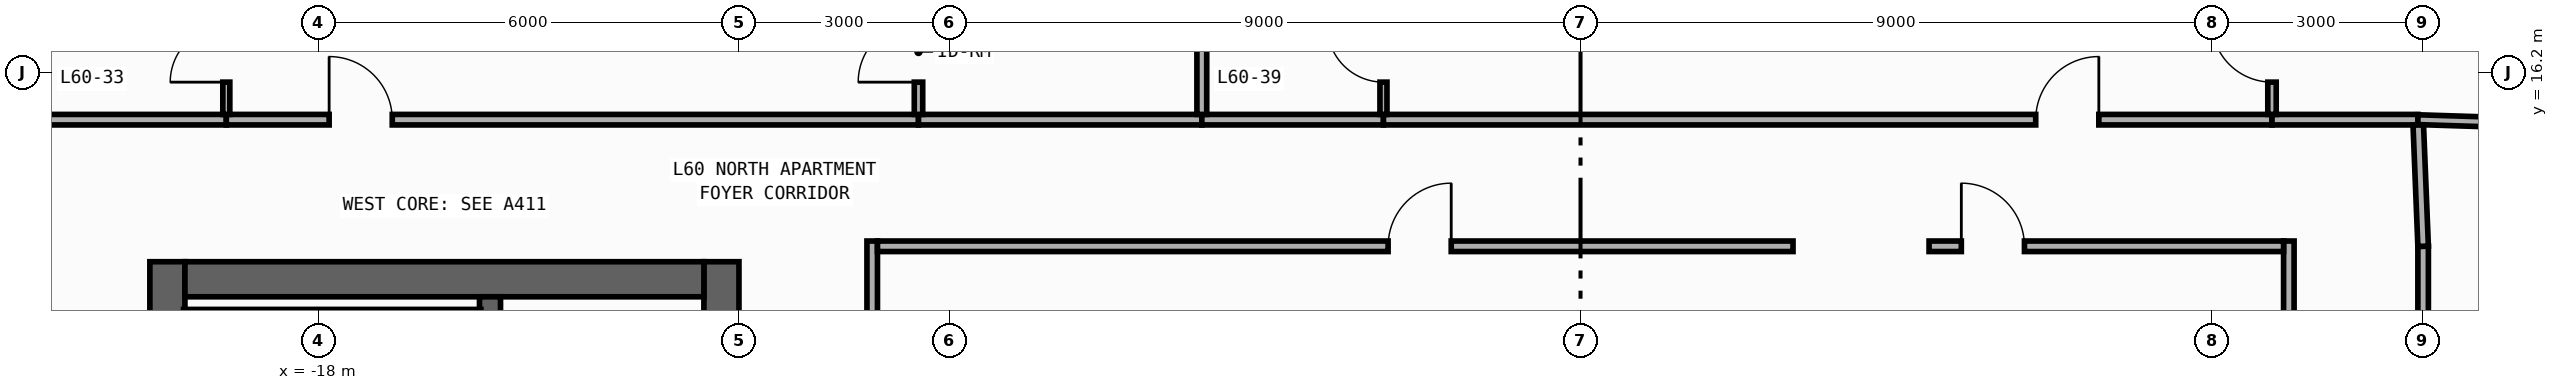
"""IFC4 building model, lengths in metres.
Left out: names, types, materials, properties, quantities, classifications, styles, units other than length and angle.
Written with IfcOpenShell. Run it as: python <this file> out.ifc"""

import sys

from ifc_helpers import new_model, si_unit, direction, frame, frame_2d, origin, place, context, subcontext, project, spatial, rectangle, extrude, element, fill, save


model = new_model("IFC4")
c1 = context("Model", 3, precision=1e-05, world=origin(), true_north=direction((0.0, 1.0)))
c2 = subcontext(c1, "Body", "Model", "MODEL_VIEW")
j1 = project(units=[si_unit("LENGTHUNIT", "METRE"), si_unit("PLANEANGLEUNIT", "RADIAN")], contexts=[c1])
p1 = place(None, origin())
s1 = spatial("IfcSite", under=j1, at=p1, CompositionType="ELEMENT")
p2 = place(p1, origin())
s2 = spatial("IfcBuilding", under=s1, at=p2, CompositionType="ELEMENT")
p3 = place(p2, frame((0.0, 0.0, 254.8)))
s3 = spatial("IfcBuildingStorey", under=s2, at=p3, CompositionType="ELEMENT", Elevation=254.8)
p4 = place(p3, frame((-20.15, -13.5, 0.0), z_axis=(0.0, 0.0, 1.0), x_axis=(0.0, 1.0, 0.0)))
e1 = element("IfcWall", 1, at=p4, inside=s3, PredefinedType="SHEAR", context=c2, shape_type="SweptSolid", body=[
    extrude(rectangle(XDim=27.0, YDim=0.5, at=frame_2d((13.5, 0.0))), origin(), (0.0, 0.0, 1.0), 3.34),
])
p5 = place(p3, frame((-12.25, -13.5, 0.0), z_axis=(0.0, 0.0, 1.0), x_axis=(0.0, 1.0, 0.0)))
e2 = element("IfcWall", 2, at=p5, inside=s3, PredefinedType="SHEAR", context=c2, shape_type="SweptSolid", body=[
    extrude(rectangle(XDim=27.0, YDim=0.5, at=frame_2d((13.5, 0.0))), origin(), (0.0, 0.0, 1.0), 3.34),
])
p6 = place(p5, frame((15.175, 0.0, 0.0)))
e3 = element("IfcOpeningElement", 3, at=p6, cuts=e2, PredefinedType="OPENING", context=c2, shape_type="SweptSolid", body=[
    extrude(rectangle(XDim=0.85, YDim=2.1, at=frame_2d((0.425, 1.05))), frame((0.0, 0.26, 0.0), z_axis=(0.0, -1.0, 0.0), x_axis=(1.0, 0.0, 0.0)), (0.0, 0.0, 1.0), 0.52),
])
p7 = place(p5, frame((21.275, 0.0, 0.0)))
e4 = element("IfcOpeningElement", 4, at=p7, cuts=e2, PredefinedType="OPENING", context=c2, shape_type="SweptSolid", body=[
    extrude(rectangle(XDim=0.85, YDim=2.1, at=frame_2d((0.425, 1.05))), frame((0.0, 0.26, 0.0), z_axis=(0.0, -1.0, 0.0), x_axis=(1.0, 0.0, 0.0)), (0.0, 0.0, 1.0), 0.52),
])
p8 = place(p5, frame((4.275, 0.0, 0.0)))
e5 = element("IfcOpeningElement", 5, at=p8, cuts=e2, PredefinedType="OPENING", context=c2, shape_type="SweptSolid", body=[
    extrude(rectangle(XDim=0.85, YDim=2.1, at=frame_2d((0.425, 1.05))), frame((0.0, 0.26, 0.0), z_axis=(0.0, -1.0, 0.0), x_axis=(1.0, 0.0, 0.0)), (0.0, 0.0, 1.0), 0.52),
])
p9 = place(p5, frame((10.275, 0.0, 0.0)))
e6 = element("IfcOpeningElement", 6, at=p9, cuts=e2, PredefinedType="OPENING", context=c2, shape_type="SweptSolid", body=[
    extrude(rectangle(XDim=0.85, YDim=2.1, at=frame_2d((0.425, 1.05))), frame((0.0, 0.26, 0.0), z_axis=(0.0, -1.0, 0.0), x_axis=(1.0, 0.0, 0.0)), (0.0, 0.0, 1.0), 0.52),
])
p10 = place(p5, frame((12.725, 0.0, 0.0)))
e7 = element("IfcOpeningElement", 7, at=p10, cuts=e2, PredefinedType="OPENING", context=c2, shape_type="SweptSolid", body=[
    extrude(rectangle(XDim=1.15, YDim=2.2, at=frame_2d((0.575, 1.1))), frame((0.0, 0.26, 0.0), z_axis=(0.0, -1.0, 0.0), x_axis=(1.0, 0.0, 0.0)), (0.0, 0.0, 1.0), 0.52),
])
p11 = place(p5, frame((1.625, 0.0, 0.0)))
e8 = element("IfcOpeningElement", 8, at=p11, cuts=e2, PredefinedType="OPENING", context=c2, shape_type="SweptSolid", body=[
    extrude(rectangle(XDim=0.85, YDim=2.1, at=frame_2d((0.425, 1.05))), frame((0.0, 0.26, 0.0), z_axis=(0.0, -1.0, 0.0), x_axis=(1.0, 0.0, 0.0)), (0.0, 0.0, 1.0), 0.52),
])
p12 = place(p3, frame((-19.9, 13.25, 0.0), z_axis=(0.0, 0.0, 1.0), x_axis=(1.0, 0.0, 0.0)))
e9 = element("IfcWall", 9, at=p12, inside=s3, PredefinedType="SHEAR", context=c2, shape_type="SweptSolid", body=[
    extrude(rectangle(XDim=7.4, YDim=0.5, at=frame_2d((3.7, 0.0))), origin(), (0.0, 0.0, 1.0), 3.34),
])
p13 = place(p3, frame((-15.55, -13.0, 0.0), z_axis=(0.0, 0.0, 1.0), x_axis=(0.0, 1.0, 0.0)))
e10 = element("IfcWall", 10, at=p13, inside=s3, PredefinedType="SHEAR", context=c2, shape_type="SweptSolid", body=[
    extrude(rectangle(XDim=26.0, YDim=0.3, at=frame_2d((13.0, 0.0))), origin(), (0.0, 0.0, 1.0), 3.34),
])
p14 = place(p13, frame((12.225, 0.0, 0.0)))
e11 = element("IfcOpeningElement", 11, at=p14, cuts=e10, PredefinedType="OPENING", context=c2, shape_type="SweptSolid", body=[
    extrude(rectangle(XDim=1.15, YDim=2.2, at=frame_2d((0.575, 1.1))), frame((0.0, 0.16, 0.0), z_axis=(0.0, -1.0, 0.0), x_axis=(1.0, 0.0, 0.0)), (0.0, 0.0, 1.0), 0.32),
])
p15 = place(p13, frame((1.125, 0.0, 0.0)))
e12 = element("IfcOpeningElement", 12, at=p15, cuts=e10, PredefinedType="OPENING", context=c2, shape_type="SweptSolid", body=[
    extrude(rectangle(XDim=0.85, YDim=2.1, at=frame_2d((0.425, 1.05))), frame((0.0, 0.16, 0.0), z_axis=(0.0, -1.0, 0.0), x_axis=(1.0, 0.0, 0.0)), (0.0, 0.0, 1.0), 0.32),
])
p16 = place(p3, frame((-19.92, 12.71, 0.0), z_axis=(0.0, 0.0, 1.0), x_axis=(1.0, 0.0, 0.0)))
e13 = element("IfcWall", 13, at=p16, inside=s3, PredefinedType="SHEAR", context=c2, shape_type="SweptSolid", body=[
    extrude(rectangle(XDim=4.24, YDim=0.22, at=frame_2d((2.12, 0.0))), origin(), (0.0, 0.0, 1.0), 3.34),
])
p17 = place(p3, frame((-10.1, 4.79, 0.0), z_axis=(0.0, 0.0, 1.0), x_axis=(0.0, 1.0, 0.0)))
e14 = element("IfcWall", 14, at=p17, inside=s3, PredefinedType="PARTITIONING", context=c2, shape_type="SweptSolid", body=[
    extrude(rectangle(XDim=9.005, YDim=0.15, at=frame_2d((4.502, 0.0))), origin(), (0.0, 0.0, 1.0), 3.34),
])
p18 = place(p17, frame((0.46, 0.0, 0.0)))
e15 = element("IfcOpeningElement", 15, at=p18, cuts=e14, PredefinedType="OPENING", context=c2, shape_type="SweptSolid", body=[
    extrude(rectangle(XDim=0.9, YDim=2.15, at=frame_2d((0.45, 1.075))), frame((0.0, 0.085, 0.0), z_axis=(0.0, -1.0, 0.0), x_axis=(1.0, 0.0, 0.0)), (0.0, 0.0, 1.0), 0.17),
])
p19 = place(p3, frame((12.015, 7.2, 0.0), z_axis=(0.0, 0.0, 1.0), x_axis=(0.0, 1.0, 0.0)))
e16 = element("IfcWall", 16, at=p19, inside=s3, PredefinedType="PARTITIONING", context=c2, shape_type="SweptSolid", body=[
    extrude(rectangle(XDim=6.52, YDim=0.15, at=frame_2d((3.26, 0.0))), origin(), (0.0, 0.0, 1.0), 3.34),
])
p20 = place(p19, frame((0.67, 0.0, 0.0)))
e17 = element("IfcOpeningElement", 17, at=p20, cuts=e16, PredefinedType="OPENING", context=c2, shape_type="SweptSolid", body=[
    extrude(rectangle(XDim=0.9, YDim=2.15, at=frame_2d((0.45, 1.075))), frame((0.0, 0.085, 0.0), z_axis=(0.0, -1.0, 0.0), x_axis=(1.0, 0.0, 0.0)), (0.0, 0.0, 1.0), 0.17),
])
p21 = place(p3, frame((10.1, 4.79, 0.0), z_axis=(0.0, 0.0, 1.0), x_axis=(0.0, 1.0, 0.0)))
e18 = element("IfcWall", 18, at=p21, inside=s3, PredefinedType="PARTITIONING", context=c2, shape_type="SweptSolid", body=[
    extrude(rectangle(XDim=9.005, YDim=0.15, at=frame_2d((4.502, 0.0))), origin(), (0.0, 0.0, 1.0), 3.34),
])
p22 = place(p21, frame((0.46, 0.0, 0.0)))
e19 = element("IfcOpeningElement", 19, at=p22, cuts=e18, PredefinedType="OPENING", context=c2, shape_type="SweptSolid", body=[
    extrude(rectangle(XDim=0.9, YDim=2.15, at=frame_2d((0.45, 1.075))), frame((0.0, 0.085, 0.0), z_axis=(0.0, -1.0, 0.0), x_axis=(1.0, 0.0, 0.0)), (0.0, 0.0, 1.0), 0.17),
])
p23 = place(p3, frame((-21.955, 15.525, 0.0), z_axis=(0.0, 0.0, 1.0), x_axis=(1.0, 0.0, 0.0)))
e20 = element("IfcWall", 20, at=p23, inside=s3, PredefinedType="PARTITIONING", context=c2, shape_type="SweptSolid", body=[
    extrude(rectangle(XDim=2.645, YDim=0.15, at=frame_2d((1.323, 0.0))), origin(), (0.0, 0.0, 1.0), 3.34),
])
p24 = place(p3, frame((-19.31, 15.525, 0.0), z_axis=(0.0, 0.0, 1.0), x_axis=(1.0, 0.0, 0.0)))
e21 = element("IfcWall", 21, at=p24, inside=s3, PredefinedType="PARTITIONING", context=c2, shape_type="SweptSolid", body=[
    extrude(rectangle(XDim=9.87, YDim=0.15, at=frame_2d((4.935, 0.0))), origin(), (0.0, 0.0, 1.0), 3.34),
])
p25 = place(p24, frame((1.466, 0.0, 0.0)))
e22 = element("IfcOpeningElement", 22, at=p25, cuts=e21, PredefinedType="OPENING", context=c2, shape_type="SweptSolid", body=[
    extrude(rectangle(XDim=0.9, YDim=2.15, at=frame_2d((0.45, 1.075))), frame((0.0, 0.085, 0.0), z_axis=(0.0, -1.0, 0.0), x_axis=(1.0, 0.0, 0.0)), (0.0, 0.0, 1.0), 0.17),
])
p26 = place(p3, frame((-9.44, 15.525, 0.0), z_axis=(0.0, 0.0, 1.0), x_axis=(1.0, 0.0, 0.0)))
e23 = element("IfcWall", 23, at=p26, inside=s3, PredefinedType="PARTITIONING", context=c2, shape_type="SweptSolid", body=[
    extrude(rectangle(XDim=4.04, YDim=0.15, at=frame_2d((2.02, 0.0))), origin(), (0.0, 0.0, 1.0), 3.34),
])
p27 = place(p3, frame((-5.4, 15.525, 0.0), z_axis=(0.0, 0.0, 1.0), x_axis=(1.0, 0.0, 0.0)))
e24 = element("IfcWall", 24, at=p27, inside=s3, PredefinedType="PARTITIONING", context=c2, shape_type="SweptSolid", body=[
    extrude(rectangle(XDim=2.59, YDim=0.15, at=frame_2d((1.295, 0.0))), origin(), (0.0, 0.0, 1.0), 3.34),
])
p28 = place(p3, frame((-2.81, 15.525, 0.0), z_axis=(0.0, 0.0, 1.0), x_axis=(1.0, 0.0, 0.0)))
e25 = element("IfcWall", 25, at=p28, inside=s3, PredefinedType="PARTITIONING", context=c2, shape_type="SweptSolid", body=[
    extrude(rectangle(XDim=12.67, YDim=0.15, at=frame_2d((6.335, 0.0))), origin(), (0.0, 0.0, 1.0), 3.34),
])
p29 = place(p28, frame((9.301, 0.0, 0.0)))
e26 = element("IfcOpeningElement", 26, at=p29, cuts=e25, PredefinedType="OPENING", context=c2, shape_type="SweptSolid", body=[
    extrude(rectangle(XDim=0.9, YDim=2.15, at=frame_2d((0.45, 1.075))), frame((0.0, 0.085, 0.0), z_axis=(0.0, -1.0, 0.0), x_axis=(1.0, 0.0, 0.0)), (0.0, 0.0, 1.0), 0.17),
])
p30 = place(p3, frame((9.86, 15.525, 0.0), z_axis=(0.0, 0.0, 1.0), x_axis=(1.0, 0.0, 0.0)))
e27 = element("IfcWall", 27, at=p30, inside=s3, PredefinedType="PARTITIONING", context=c2, shape_type="SweptSolid", body=[
    extrude(rectangle(XDim=2.08, YDim=0.15, at=frame_2d((1.04, 0.0))), origin(), (0.0, 0.0, 1.0), 3.34),
])
p31 = place(p3, frame((12.015, 13.72, 0.0), z_axis=(0.0, 0.0, 1.0), x_axis=(-0.040046877756, 0.99919780203, 0.0)))
e28 = element("IfcWall", 28, at=p31, inside=s3, PredefinedType="PARTITIONING", context=c2, shape_type="SweptSolid", body=[
    extrude(rectangle(XDim=1.731, YDim=0.15, at=frame_2d((0.866, 0.0))), origin(), (0.0, 0.0, 1.0), 3.34),
])
p32 = place(p3, frame((-10.025, 13.72, 0.0), z_axis=(0.0, 0.0, 1.0), x_axis=(1.0, 0.0, 0.0)))
e29 = element("IfcWall", 29, at=p32, inside=s3, PredefinedType="PARTITIONING", context=c2, shape_type="SweptSolid", body=[
    extrude(rectangle(XDim=13.055, YDim=0.15, at=frame_2d((6.527, 0.0))), origin(), (0.0, 0.0, 1.0), 3.34),
])
p33 = place(p32, frame((7.281, 0.0, 0.0)))
e30 = element("IfcOpeningElement", 30, at=p33, cuts=e29, PredefinedType="OPENING", context=c2, shape_type="SweptSolid", body=[
    extrude(rectangle(XDim=0.9, YDim=2.15, at=frame_2d((0.45, 1.075))), frame((0.0, 0.085, 0.0), z_axis=(0.0, -1.0, 0.0), x_axis=(1.0, 0.0, 0.0)), (0.0, 0.0, 1.0), 0.17),
])
p34 = place(p3, frame((4.97, 13.72, 0.0), z_axis=(0.0, 0.0, 1.0), x_axis=(1.0, 0.0, 0.0)))
e31 = element("IfcWall", 31, at=p34, inside=s3, PredefinedType="PARTITIONING", context=c2, shape_type="SweptSolid", body=[
    extrude(rectangle(XDim=5.055, YDim=0.15, at=frame_2d((2.527, 0.0))), origin(), (0.0, 0.0, 1.0), 3.34),
])
p35 = place(p34, frame((0.46, 0.0, 0.0)))
e32 = element("IfcOpeningElement", 32, at=p35, cuts=e31, PredefinedType="OPENING", context=c2, shape_type="SweptSolid", body=[
    extrude(rectangle(XDim=0.9, YDim=2.15, at=frame_2d((0.45, 1.075))), frame((0.0, 0.085, 0.0), z_axis=(0.0, -1.0, 0.0), x_axis=(1.0, 0.0, 0.0)), (0.0, 0.0, 1.0), 0.17),
])
p36 = place(p3, frame((-19.31, 15.6, 0.0), z_axis=(0.0, 0.0, 1.0), x_axis=(0.0, 1.0, 0.0)))
e33 = element("IfcWall", 33, at=p36, inside=s3, PredefinedType="PARTITIONING", context=c2, shape_type="SweptSolid", body=[
    extrude(rectangle(XDim=2.5, YDim=0.1, at=frame_2d((1.25, 0.0))), origin(), (0.0, 0.0, 1.0), 3.34),
])
p37 = place(p36, frame((0.46, 0.0, 0.0)))
e34 = element("IfcOpeningElement", 34, at=p37, cuts=e33, PredefinedType="OPENING", context=c2, shape_type="SweptSolid", body=[
    extrude(rectangle(XDim=0.8, YDim=2.1, at=frame_2d((0.4, 1.05))), frame((0.0, 0.06, 0.0), z_axis=(0.0, -1.0, 0.0), x_axis=(1.0, 0.0, 0.0)), (0.0, 0.0, 1.0), 0.12),
])
p38 = place(p3, frame((-9.44, 15.6, 0.0), z_axis=(0.0, 0.0, 1.0), x_axis=(0.0, 1.0, 0.0)))
e35 = element("IfcWall", 35, at=p38, inside=s3, PredefinedType="PARTITIONING", context=c2, shape_type="SweptSolid", body=[
    extrude(rectangle(XDim=4.5, YDim=0.12, at=frame_2d((2.25, 0.0))), origin(), (0.0, 0.0, 1.0), 2.44),
])
p39 = place(p38, frame((0.46, 0.0, 0.0)))
e36 = element("IfcOpeningElement", 36, at=p39, cuts=e35, PredefinedType="OPENING", context=c2, shape_type="SweptSolid", body=[
    extrude(rectangle(XDim=0.86, YDim=2.15, at=frame_2d((0.43, 1.075))), frame((0.0, 0.07, 0.0), z_axis=(0.0, -1.0, 0.0), x_axis=(1.0, 0.0, 0.0)), (0.0, 0.0, 1.0), 0.14),
])
p40 = place(p3, frame((-5.4, 15.6, 0.0), z_axis=(0.0, 0.0, 1.0), x_axis=(0.0, 1.0, 0.0)))
e37 = element("IfcWall", 37, at=p40, inside=s3, PredefinedType="PARTITIONING", context=c2, shape_type="SweptSolid", body=[
    extrude(rectangle(XDim=2.5, YDim=0.14, at=frame_2d((1.25, 0.0))), origin(), (0.0, 0.0, 1.0), 3.34),
])
p41 = place(p3, frame((-2.81, 15.6, 0.0), z_axis=(0.0, 0.0, 1.0), x_axis=(0.0, 1.0, 0.0)))
e38 = element("IfcWall", 38, at=p41, inside=s3, PredefinedType="PARTITIONING", context=c2, shape_type="SweptSolid", body=[
    extrude(rectangle(XDim=2.5, YDim=0.1, at=frame_2d((1.25, 0.0))), origin(), (0.0, 0.0, 1.0), 3.34),
])
p42 = place(p41, frame((0.46, 0.0, 0.0)))
e39 = element("IfcOpeningElement", 39, at=p42, cuts=e38, PredefinedType="OPENING", context=c2, shape_type="SweptSolid", body=[
    extrude(rectangle(XDim=0.8, YDim=2.1, at=frame_2d((0.4, 1.05))), frame((0.0, 0.06, 0.0), z_axis=(0.0, -1.0, 0.0), x_axis=(1.0, 0.0, 0.0)), (0.0, 0.0, 1.0), 0.12),
])
p43 = place(p3, frame((9.86, 15.6, 0.0), z_axis=(0.0, 0.0, 1.0), x_axis=(0.0, 1.0, 0.0)))
e40 = element("IfcWall", 40, at=p43, inside=s3, PredefinedType="PARTITIONING", context=c2, shape_type="SweptSolid", body=[
    extrude(rectangle(XDim=4.5, YDim=0.12, at=frame_2d((2.25, 0.0))), origin(), (0.0, 0.0, 1.0), 3.34),
])
p44 = place(p43, frame((0.46, 0.0, 0.0)))
e41 = element("IfcOpeningElement", 41, at=p44, cuts=e40, PredefinedType="OPENING", context=c2, shape_type="SweptSolid", body=[
    extrude(rectangle(XDim=0.86, YDim=2.15, at=frame_2d((0.43, 1.075))), frame((0.0, 0.07, 0.0), z_axis=(0.0, -1.0, 0.0), x_axis=(1.0, 0.0, 0.0)), (0.0, 0.0, 1.0), 0.14),
])
p45 = place(p3, frame((11.94, 15.525, 0.0), z_axis=(0.0, 0.0, 1.0), x_axis=(0.999493701671, -0.031817295912, 0.0)))
e42 = element("IfcWall", 42, at=p45, inside=s3, PredefinedType="PARTITIONING", context=c2, shape_type="SweptSolid", body=[
    extrude(rectangle(XDim=2.041, YDim=0.14, at=frame_2d((1.021, 0.0))), origin(), (0.0, 0.0, 1.0), 3.34),
])
p46 = place(p25, origin())
e43 = element("IfcDoor", 43, at=p46, inside=s3, OperationType="SINGLE_SWING_LEFT", PredefinedType="DOOR", context=c2, shape_type="SweptSolid", body=[
    extrude(rectangle(XDim=0.9, YDim=2.15, at=frame_2d((0.45, 1.075))), frame((0.0, 0.025, 0.0), z_axis=(0.0, -1.0, 0.0), x_axis=(1.0, 0.0, 0.0)), (0.0, 0.0, 1.0), 0.05),
])
fill(e22, e43)
p47 = place(p29, origin())
e44 = element("IfcDoor", 44, at=p47, inside=s3, OperationType="SINGLE_SWING_RIGHT", PredefinedType="DOOR", context=c2, shape_type="SweptSolid", body=[
    extrude(rectangle(XDim=0.9, YDim=2.15, at=frame_2d((0.45, 1.075))), frame((0.0, 0.025, 0.0), z_axis=(0.0, -1.0, 0.0), x_axis=(1.0, 0.0, 0.0)), (0.0, 0.0, 1.0), 0.05),
])
fill(e26, e44)
p48 = place(p33, origin())
e45 = element("IfcDoor", 45, at=p48, inside=s3, OperationType="SINGLE_SWING_RIGHT", PredefinedType="DOOR", context=c2, shape_type="SweptSolid", body=[
    extrude(rectangle(XDim=0.9, YDim=2.15, at=frame_2d((0.45, 1.075))), frame((0.0, 0.025, 0.0), z_axis=(0.0, -1.0, 0.0), x_axis=(1.0, 0.0, 0.0)), (0.0, 0.0, 1.0), 0.05),
])
fill(e30, e45)
p49 = place(p35, origin())
e46 = element("IfcDoor", 46, at=p49, inside=s3, OperationType="SINGLE_SWING_LEFT", PredefinedType="DOOR", context=c2, shape_type="SweptSolid", body=[
    extrude(rectangle(XDim=0.9, YDim=2.15, at=frame_2d((0.45, 1.075))), frame((0.0, 0.025, 0.0), z_axis=(0.0, -1.0, 0.0), x_axis=(1.0, 0.0, 0.0)), (0.0, 0.0, 1.0), 0.05),
])
fill(e32, e46)
p50 = place(p37, origin())
e47 = element("IfcDoor", 47, at=p50, inside=s3, OperationType="SINGLE_SWING_LEFT", PredefinedType="DOOR", context=c2, shape_type="SweptSolid", body=[
    extrude(rectangle(XDim=0.8, YDim=2.1, at=frame_2d((0.4, 1.05))), frame((0.0, 0.025, 0.0), z_axis=(0.0, -1.0, 0.0), x_axis=(1.0, 0.0, 0.0)), (0.0, 0.0, 1.0), 0.05),
])
fill(e34, e47)
p51 = place(p39, origin())
e48 = element("IfcDoor", 48, at=p51, inside=s3, OperationType="SINGLE_SWING_LEFT", PredefinedType="DOOR", context=c2, shape_type="SweptSolid", body=[
    extrude(rectangle(XDim=0.86, YDim=2.15, at=frame_2d((0.43, 1.075))), frame((0.0, 0.025, 0.0), z_axis=(0.0, -1.0, 0.0), x_axis=(1.0, 0.0, 0.0)), (0.0, 0.0, 1.0), 0.05),
])
fill(e36, e48)
p52 = place(p42, origin())
e49 = element("IfcDoor", 49, at=p52, inside=s3, OperationType="SINGLE_SWING_RIGHT", PredefinedType="DOOR", context=c2, shape_type="SweptSolid", body=[
    extrude(rectangle(XDim=0.8, YDim=2.1, at=frame_2d((0.4, 1.05))), frame((0.0, 0.025, 0.0), z_axis=(0.0, -1.0, 0.0), x_axis=(1.0, 0.0, 0.0)), (0.0, 0.0, 1.0), 0.05),
])
fill(e39, e49)
p53 = place(p44, origin())
e50 = element("IfcDoor", 50, at=p53, inside=s3, OperationType="SINGLE_SWING_RIGHT", PredefinedType="DOOR", context=c2, shape_type="SweptSolid", body=[
    extrude(rectangle(XDim=0.86, YDim=2.15, at=frame_2d((0.43, 1.075))), frame((0.0, 0.025, 0.0), z_axis=(0.0, -1.0, 0.0), x_axis=(1.0, 0.0, 0.0)), (0.0, 0.0, 1.0), 0.05),
])
fill(e41, e50)
save(model, sys.argv[1])
